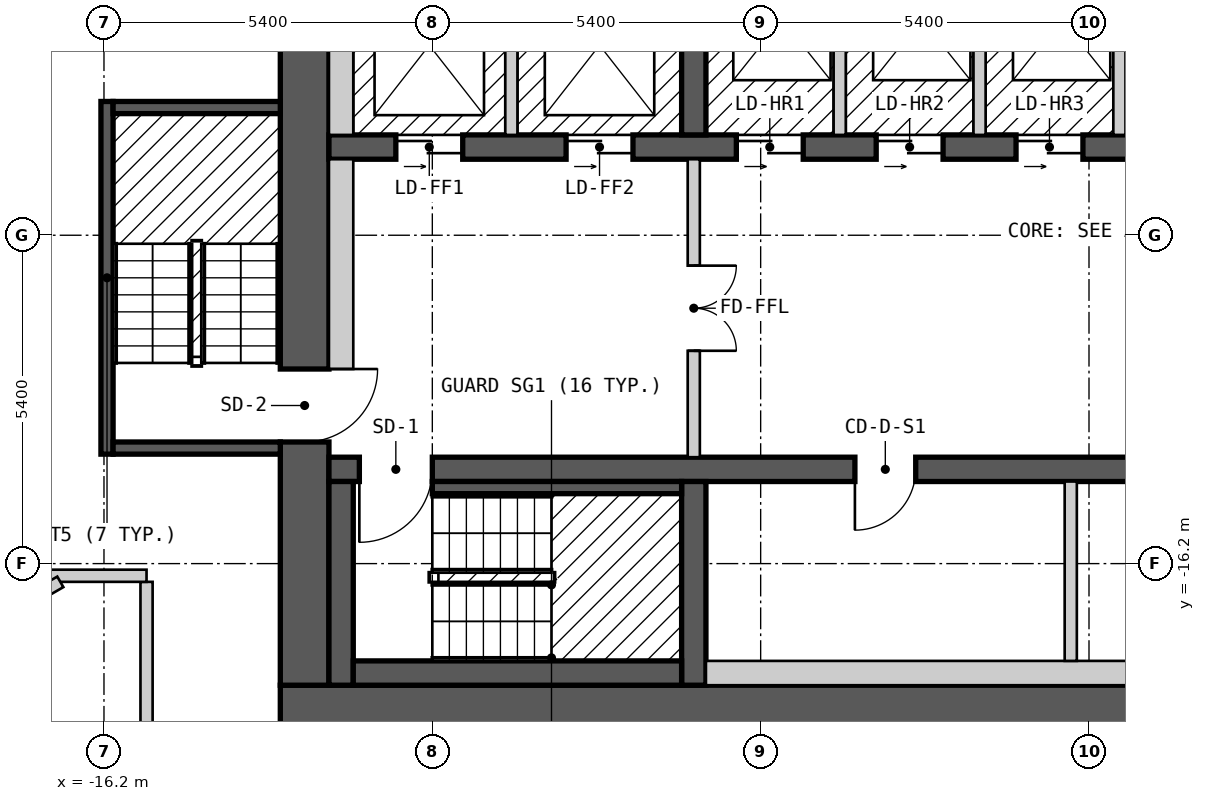
"""IFC4 building model, lengths in metres.
Left out: names, types, materials, properties, quantities, classifications, styles, units other than length and angle.
Written with IfcOpenShell. Run it as: python <this file> out.ifc"""

import sys

from ifc_helpers import new_model, si_unit, direction, frame, frame_2d, origin, place, context, subcontext, project, spatial, polyline, rectangle, outline, extrude, element, fill, save


model = new_model("IFC4")
c1 = context("Model", 3, precision=1e-05, world=origin(), true_north=direction((0.0, 1.0)))
c2 = subcontext(c1, "Body", "Model", "MODEL_VIEW")
j1 = project(units=[si_unit("LENGTHUNIT", "METRE"), si_unit("PLANEANGLEUNIT", "RADIAN")], contexts=[c1])
p1 = place(None, origin())
s1 = spatial("IfcSite", under=j1, at=p1, CompositionType="ELEMENT")
p2 = place(p1, origin())
s2 = spatial("IfcBuilding", under=s1, at=p2, CompositionType="ELEMENT")
p3 = place(p2, frame((0.0, 0.0, 144.6)))
s3 = spatial("IfcBuildingStorey", under=s2, at=p3, CompositionType="ELEMENT", Elevation=144.6)
p4 = place(p3, frame((-13.3, -18.6, 0.0), z_axis=(0.0, 0.0, 1.0), x_axis=(1.0, 0.0, 0.0)))
e1 = element("IfcWall", 1, at=p4, inside=s3, PredefinedType="SHEAR", context=c2, shape_type="SweptSolid", body=[
    extrude(rectangle(XDim=26.6, YDim=0.8, at=frame_2d((13.3, 0.0))), origin(), (0.0, 0.0, 1.0), 2.7),
])
p5 = place(p3, frame((-12.9, -18.2, 0.0), z_axis=(0.0, 0.0, 1.0), x_axis=(0.0, 1.0, 0.0)))
e2 = element("IfcWall", 2, at=p5, inside=s3, PredefinedType="SHEAR", context=c2, shape_type="SweptSolid", body=[
    extrude(rectangle(XDim=12.4, YDim=0.8, at=frame_2d((6.2, 0.0))), origin(), (0.0, 0.0, 1.0), 2.7),
])
p6 = place(p5, frame((4.0, 0.0, 0.0)))
e3 = element("IfcOpeningElement", 3, at=p6, cuts=e2, PredefinedType="OPENING", context=c2, shape_type="SweptSolid", body=[
    extrude(rectangle(XDim=1.2, YDim=2.1, at=frame_2d((0.6, 1.05))), frame((0.0, 0.41, 0.0), z_axis=(0.0, -1.0, 0.0), x_axis=(1.0, 0.0, 0.0)), (0.0, 0.0, 1.0), 0.82),
])
p7 = place(p3, frame((-12.5, -14.65, 0.0), z_axis=(0.0, 0.0, 1.0), x_axis=(1.0, 0.0, 0.0)))
e4 = element("IfcWall", 4, at=p7, inside=s3, PredefinedType="SHEAR", context=c2, shape_type="SweptSolid", body=[
    extrude(rectangle(XDim=25.0, YDim=0.4, at=frame_2d((12.5, 0.0))), origin(), (0.0, 0.0, 1.0), 2.7),
])
p8 = place(p7, frame((1.7, 0.0, 0.0), z_axis=(0.0, 0.0, 1.0), x_axis=(-1.0, 0.0, 0.0)))
e5 = element("IfcOpeningElement", 5, at=p8, cuts=e4, PredefinedType="OPENING", context=c2, shape_type="SweptSolid", body=[
    extrude(rectangle(XDim=1.2, YDim=2.1, at=frame_2d((0.6, 1.05))), frame((0.0, 0.21, 0.0), z_axis=(0.0, -1.0, 0.0), x_axis=(1.0, 0.0, 0.0)), (0.0, 0.0, 1.0), 0.42),
])
p9 = place(p7, frame((24.55, 0.0, 0.0), z_axis=(0.0, 0.0, 1.0), x_axis=(-1.0, 0.0, 0.0)))
e6 = element("IfcOpeningElement", 6, at=p9, cuts=e4, PredefinedType="OPENING", context=c2, shape_type="SweptSolid", body=[
    extrude(rectangle(XDim=1.2, YDim=2.1, at=frame_2d((0.6, 1.05))), frame((0.0, 0.21, 0.0), z_axis=(0.0, -1.0, 0.0), x_axis=(1.0, 0.0, 0.0)), (0.0, 0.0, 1.0), 0.42),
])
p10 = place(p7, frame((9.65, 0.0, 0.0), z_axis=(0.0, 0.0, 1.0), x_axis=(-1.0, 0.0, 0.0)))
e7 = element("IfcOpeningElement", 7, at=p10, cuts=e4, PredefinedType="OPENING", context=c2, shape_type="SweptSolid", body=[
    extrude(rectangle(XDim=1.0, YDim=2.1, at=frame_2d((0.5, 1.05))), frame((0.0, 0.21, 0.0), z_axis=(0.0, -1.0, 0.0), x_axis=(1.0, 0.0, 0.0)), (0.0, 0.0, 1.0), 0.42),
])
p11 = place(p7, frame((16.05, 0.0, 0.0), z_axis=(0.0, 0.0, 1.0), x_axis=(-1.0, 0.0, 0.0)))
e8 = element("IfcOpeningElement", 8, at=p11, cuts=e4, PredefinedType="OPENING", context=c2, shape_type="SweptSolid", body=[
    extrude(rectangle(XDim=1.0, YDim=2.1, at=frame_2d((0.5, 1.05))), frame((0.0, 0.21, 0.0), z_axis=(0.0, -1.0, 0.0), x_axis=(1.0, 0.0, 0.0)), (0.0, 0.0, 1.0), 0.42),
])
p12 = place(p3, frame((-12.5, -9.35, 0.0), z_axis=(0.0, 0.0, 1.0), x_axis=(1.0, 0.0, 0.0)))
e9 = element("IfcWall", 9, at=p12, inside=s3, PredefinedType="SHEAR", context=c2, shape_type="SweptSolid", body=[
    extrude(rectangle(XDim=22.7, YDim=0.4, at=frame_2d((11.35, 0.0))), origin(), (0.0, 0.0, 1.0), 2.7),
])
p13 = place(p12, frame((1.1, 0.0, 0.0)))
e10 = element("IfcOpeningElement", 10, at=p13, cuts=e9, PredefinedType="OPENING", context=c2, shape_type="SweptSolid", body=[
    extrude(rectangle(XDim=1.1, YDim=2.1, at=frame_2d((0.55, 1.05))), frame((0.0, 0.21, 0.0), z_axis=(0.0, -1.0, 0.0), x_axis=(1.0, 0.0, 0.0)), (0.0, 0.0, 1.0), 0.42),
])
p14 = place(p12, frame((3.9, 0.0, 0.0)))
e11 = element("IfcOpeningElement", 11, at=p14, cuts=e9, PredefinedType="OPENING", context=c2, shape_type="SweptSolid", body=[
    extrude(rectangle(XDim=1.1, YDim=2.1, at=frame_2d((0.55, 1.05))), frame((0.0, 0.21, 0.0), z_axis=(0.0, -1.0, 0.0), x_axis=(1.0, 0.0, 0.0)), (0.0, 0.0, 1.0), 0.42),
])
p15 = place(p12, frame((6.7, 0.0, 0.0)))
e12 = element("IfcOpeningElement", 12, at=p15, cuts=e9, PredefinedType="OPENING", context=c2, shape_type="SweptSolid", body=[
    extrude(rectangle(XDim=1.1, YDim=2.1, at=frame_2d((0.55, 1.05))), frame((0.0, 0.21, 0.0), z_axis=(0.0, -1.0, 0.0), x_axis=(1.0, 0.0, 0.0)), (0.0, 0.0, 1.0), 0.42),
])
p16 = place(p12, frame((9.0, 0.0, 0.0)))
e13 = element("IfcOpeningElement", 13, at=p16, cuts=e9, PredefinedType="OPENING", context=c2, shape_type="SweptSolid", body=[
    extrude(rectangle(XDim=1.1, YDim=2.1, at=frame_2d((0.55, 1.05))), frame((0.0, 0.21, 0.0), z_axis=(0.0, -1.0, 0.0), x_axis=(1.0, 0.0, 0.0)), (0.0, 0.0, 1.0), 0.42),
])
p17 = place(p12, frame((11.3, 0.0, 0.0)))
e14 = element("IfcOpeningElement", 14, at=p17, cuts=e9, PredefinedType="OPENING", context=c2, shape_type="SweptSolid", body=[
    extrude(rectangle(XDim=1.1, YDim=2.1, at=frame_2d((0.55, 1.05))), frame((0.0, 0.21, 0.0), z_axis=(0.0, -1.0, 0.0), x_axis=(1.0, 0.0, 0.0)), (0.0, 0.0, 1.0), 0.42),
])
p18 = place(p12, frame((13.6, 0.0, 0.0)))
e15 = element("IfcOpeningElement", 15, at=p18, cuts=e9, PredefinedType="OPENING", context=c2, shape_type="SweptSolid", body=[
    extrude(rectangle(XDim=1.1, YDim=2.1, at=frame_2d((0.55, 1.05))), frame((0.0, 0.21, 0.0), z_axis=(0.0, -1.0, 0.0), x_axis=(1.0, 0.0, 0.0)), (0.0, 0.0, 1.0), 0.42),
])
p19 = place(p12, frame((15.9, 0.0, 0.0)))
e16 = element("IfcOpeningElement", 16, at=p19, cuts=e9, PredefinedType="OPENING", context=c2, shape_type="SweptSolid", body=[
    extrude(rectangle(XDim=1.1, YDim=2.1, at=frame_2d((0.55, 1.05))), frame((0.0, 0.21, 0.0), z_axis=(0.0, -1.0, 0.0), x_axis=(1.0, 0.0, 0.0)), (0.0, 0.0, 1.0), 0.42),
])
p20 = place(p12, frame((18.2, 0.0, 0.0)))
e17 = element("IfcOpeningElement", 17, at=p20, cuts=e9, PredefinedType="OPENING", context=c2, shape_type="SweptSolid", body=[
    extrude(rectangle(XDim=1.1, YDim=2.1, at=frame_2d((0.55, 1.05))), frame((0.0, 0.21, 0.0), z_axis=(0.0, -1.0, 0.0), x_axis=(1.0, 0.0, 0.0)), (0.0, 0.0, 1.0), 0.42),
])
p21 = place(p12, frame((20.6, 0.0, 0.0)))
e18 = element("IfcOpeningElement", 18, at=p21, cuts=e9, PredefinedType="OPENING", context=c2, shape_type="SweptSolid", body=[
    extrude(rectangle(XDim=1.1, YDim=2.1, at=frame_2d((0.55, 1.05))), frame((0.0, 0.21, 0.0), z_axis=(0.0, -1.0, 0.0), x_axis=(1.0, 0.0, 0.0)), (0.0, 0.0, 1.0), 0.42),
])
for number, where, z_axis, x_axis in (
    (19, (-6.5, -18.2, 0.0), (0.0, 0.0, 1.0), (0.0, 1.0, 0.0)),
    (20, (-6.5, -9.15, 0.0), (0.0, 0.0, 1.0), (0.0, 1.0, 0.0)),
):
    element("IfcWall", number, at=place(p3, frame(where, z_axis=z_axis, x_axis=x_axis)), inside=s3, PredefinedType="SHEAR", context=c2, shape_type="SweptSolid", body=[
        extrude(rectangle(XDim=3.35, YDim=0.4, at=frame_2d((1.675, 0.0))), origin(), (0.0, 0.0, 1.0), 2.7),
    ])
p22 = place(p3, frame((-28.218, -2.025, 0.0), z_axis=(0.0, 0.0, 1.0), x_axis=(0.500017503135, -0.866015298109, 0.0)))
e21 = element("IfcWall", 21, at=p22, inside=s3, PredefinedType="SOLIDWALL", context=c2, shape_type="SweptSolid", body=[
    extrude(outline(polyline([(0.0, -0.15), (24.711, -0.15), (24.631, 0.15), (0.08, 0.15), (0.0, -0.15)])), origin(), (0.0, 0.0, 1.0), 2.7),
])
p23 = place(p22, frame((1.4, 0.0, 0.15)))
e22 = element("IfcOpeningElement", 22, at=p23, cuts=e21, PredefinedType="OPENING", context=c2, shape_type="SweptSolid", body=[
    extrude(rectangle(XDim=1.5, YDim=2.1, at=frame_2d((0.75, 1.05))), frame((0.0, 0.16, 0.0), z_axis=(0.0, -1.0, 0.0), x_axis=(1.0, 0.0, 0.0)), (0.0, 0.0, 1.0), 0.32),
])
p24 = place(p22, frame((4.316, 0.0, 0.15)))
e23 = element("IfcOpeningElement", 23, at=p24, cuts=e21, PredefinedType="OPENING", context=c2, shape_type="SweptSolid", body=[
    extrude(rectangle(XDim=1.5, YDim=2.1, at=frame_2d((0.75, 1.05))), frame((0.0, 0.16, 0.0), z_axis=(0.0, -1.0, 0.0), x_axis=(1.0, 0.0, 0.0)), (0.0, 0.0, 1.0), 0.32),
])
p25 = place(p22, frame((7.231, 0.0, 0.15)))
e24 = element("IfcOpeningElement", 24, at=p25, cuts=e21, PredefinedType="OPENING", context=c2, shape_type="SweptSolid", body=[
    extrude(rectangle(XDim=1.5, YDim=2.1, at=frame_2d((0.75, 1.05))), frame((0.0, 0.16, 0.0), z_axis=(0.0, -1.0, 0.0), x_axis=(1.0, 0.0, 0.0)), (0.0, 0.0, 1.0), 0.32),
])
p26 = place(p22, frame((10.147, 0.0, 0.15)))
e25 = element("IfcOpeningElement", 25, at=p26, cuts=e21, PredefinedType="OPENING", context=c2, shape_type="SweptSolid", body=[
    extrude(rectangle(XDim=1.5, YDim=2.1, at=frame_2d((0.75, 1.05))), frame((0.0, 0.16, 0.0), z_axis=(0.0, -1.0, 0.0), x_axis=(1.0, 0.0, 0.0)), (0.0, 0.0, 1.0), 0.32),
])
p27 = place(p22, frame((13.062, 0.0, 0.15)))
e26 = element("IfcOpeningElement", 26, at=p27, cuts=e21, PredefinedType="OPENING", context=c2, shape_type="SweptSolid", body=[
    extrude(rectangle(XDim=1.5, YDim=2.1, at=frame_2d((0.75, 1.05))), frame((0.0, 0.16, 0.0), z_axis=(0.0, -1.0, 0.0), x_axis=(1.0, 0.0, 0.0)), (0.0, 0.0, 1.0), 0.32),
])
p28 = place(p22, frame((15.977, 0.0, 0.15)))
e27 = element("IfcOpeningElement", 27, at=p28, cuts=e21, PredefinedType="OPENING", context=c2, shape_type="SweptSolid", body=[
    extrude(rectangle(XDim=1.5, YDim=2.1, at=frame_2d((0.75, 1.05))), frame((0.0, 0.16, 0.0), z_axis=(0.0, -1.0, 0.0), x_axis=(1.0, 0.0, 0.0)), (0.0, 0.0, 1.0), 0.32),
])
p29 = place(p22, frame((18.893, 0.0, 0.15)))
e28 = element("IfcOpeningElement", 28, at=p29, cuts=e21, PredefinedType="OPENING", context=c2, shape_type="SweptSolid", body=[
    extrude(rectangle(XDim=1.5, YDim=2.1, at=frame_2d((0.75, 1.05))), frame((0.0, 0.16, 0.0), z_axis=(0.0, -1.0, 0.0), x_axis=(1.0, 0.0, 0.0)), (0.0, 0.0, 1.0), 0.32),
])
p30 = place(p22, frame((21.809, 0.0, 0.15)))
e29 = element("IfcOpeningElement", 29, at=p30, cuts=e21, PredefinedType="OPENING", context=c2, shape_type="SweptSolid", body=[
    extrude(rectangle(XDim=1.5, YDim=2.1, at=frame_2d((0.75, 1.05))), frame((0.0, 0.16, 0.0), z_axis=(0.0, -1.0, 0.0), x_axis=(1.0, 0.0, 0.0)), (0.0, 0.0, 1.0), 0.32),
])
p31 = place(p3, frame((-15.5, -16.5, 0.0), z_axis=(0.0, 0.0, 1.0), x_axis=(0.0, -1.0, 0.0)))
e30 = element("IfcWall", 30, at=p31, inside=s3, PredefinedType="PARTITIONING", context=c2, shape_type="SweptSolid", body=[
    extrude(rectangle(XDim=4.599, YDim=0.2, at=frame_2d((2.3, 0.0))), origin(), (0.0, 0.0, 1.0), 2.7),
])
p32 = place(p3, frame((-18.249, -16.4, 0.0), z_axis=(0.0, 0.0, 1.0), x_axis=(1.0, 0.0, 0.0)))
e31 = element("IfcWall", 31, at=p32, inside=s3, PredefinedType="PARTITIONING", context=c2, shape_type="SweptSolid", body=[
    extrude(rectangle(XDim=2.749, YDim=0.2, at=frame_2d((1.375, 0.0))), origin(), (0.0, 0.0, 1.0), 2.7),
])
p33 = place(p3, frame((-18.995, -17.699, 0.0), z_axis=(0.0, 0.0, 1.0), x_axis=(0.86607371389, 0.499916315105, 0.0)))
e32 = element("IfcWall", 32, at=p33, inside=s3, PredefinedType="PARTITIONING", context=c2, shape_type="SweptSolid", body=[
    extrude(rectangle(XDim=2.398, YDim=0.2, at=frame_2d((1.199, 0.0))), origin(), (0.0, 0.0, 1.0), 2.7),
])
p34 = place(p3, frame((-16.15, -14.4, 0.0), z_axis=(0.0, 0.0, 1.0), x_axis=(0.0, 1.0, 0.0)))
e33 = element("IfcWall", 33, at=p34, inside=s3, PredefinedType="SOLIDWALL", context=c2, shape_type="SweptSolid", body=[
    extrude(rectangle(XDim=5.8, YDim=0.2, at=frame_2d((2.9, 0.0))), origin(), (0.0, 0.0, 1.0), 2.7),
])
for number, where, z_axis, x_axis in (
    (34, (-16.05, -14.3, 0.0), (0.0, 0.0, 1.0), (1.0, 0.0, 0.0)),
    (35, (-16.05, -8.7, 0.0), (0.0, 0.0, 1.0), (1.0, 0.0, 0.0)),
):
    element("IfcWall", number, at=place(p3, frame(where, z_axis=z_axis, x_axis=x_axis)), inside=s3, PredefinedType="SOLIDWALL", context=c2, shape_type="SweptSolid", body=[
        extrude(rectangle(XDim=2.75, YDim=0.2, at=frame_2d((1.375, 0.0))), origin(), (0.0, 0.0, 1.0), 2.7),
    ])
p35 = place(p3, frame((-12.3, -18.2, 0.0), z_axis=(0.0, 0.0, 1.0), x_axis=(0.0, 1.0, 0.0)))
e36 = element("IfcWall", 36, at=p35, inside=s3, PredefinedType="SOLIDWALL", context=c2, shape_type="SweptSolid", body=[
    extrude(rectangle(XDim=3.35, YDim=0.4, at=frame_2d((1.675, 0.0))), origin(), (0.0, 0.0, 1.0), 2.7),
])
p36 = place(p3, frame((-12.3, -13.0, 0.0), z_axis=(0.0, 0.0, 1.0), x_axis=(0.0, 1.0, 0.0)))
e37 = element("IfcWall", 37, at=p36, inside=s3, PredefinedType="PARTITIONING", context=c2, shape_type="SweptSolid", body=[
    extrude(rectangle(XDim=3.45, YDim=0.4, at=frame_2d((1.725, 0.0))), origin(), (0.0, 0.0, 1.0), 2.7),
])
p37 = place(p3, frame((-12.3, -9.15, 0.0), z_axis=(0.0, 0.0, 1.0), x_axis=(0.0, 1.0, 0.0)))
e38 = element("IfcWall", 38, at=p37, inside=s3, PredefinedType="SOLIDWALL", context=c2, shape_type="SweptSolid", body=[
    extrude(rectangle(XDim=3.35, YDim=0.4, at=frame_2d((1.675, 0.0))), origin(), (0.0, 0.0, 1.0), 2.7),
])
p38 = place(p3, frame((-12.1, -18.0, 0.0), z_axis=(0.0, 0.0, 1.0), x_axis=(1.0, 0.0, 0.0)))
e39 = element("IfcWall", 39, at=p38, inside=s3, PredefinedType="SOLIDWALL", context=c2, shape_type="SweptSolid", body=[
    extrude(rectangle(XDim=5.4, YDim=0.4, at=frame_2d((2.7, 0.0))), origin(), (0.0, 0.0, 1.0), 2.7),
])
p39 = place(p3, frame((-10.8, -14.95, 0.0), z_axis=(0.0, 0.0, 1.0), x_axis=(1.0, 0.0, 0.0)))
e40 = element("IfcWall", 40, at=p39, inside=s3, PredefinedType="SOLIDWALL", context=c2, shape_type="SweptSolid", body=[
    extrude(rectangle(XDim=4.1, YDim=0.2, at=frame_2d((2.05, 0.0))), origin(), (0.0, 0.0, 1.0), 2.7),
])
p40 = place(p3, frame((-9.5, -9.15, 0.0), z_axis=(0.0, 0.0, 1.0), x_axis=(0.0, 1.0, 0.0)))
e41 = element("IfcWall", 41, at=p40, inside=s3, PredefinedType="SOLIDWALL", context=c2, shape_type="SweptSolid", body=[
    extrude(rectangle(XDim=2.95, YDim=0.2, at=frame_2d((1.475, 0.0))), origin(), (0.0, 0.0, 1.0), 2.7),
])
p41 = place(p3, frame((-6.5, -14.45, 0.0), z_axis=(0.0, 0.0, 1.0), x_axis=(0.0, 1.0, 0.0)))
e42 = element("IfcWall", 42, at=p41, inside=s3, PredefinedType="PARTITIONING", context=c2, shape_type="SweptSolid", body=[
    extrude(rectangle(XDim=4.9, YDim=0.2, at=frame_2d((2.45, 0.0))), origin(), (0.0, 0.0, 1.0), 2.7),
])
p42 = place(p41, frame((3.15, 0.0, 0.0), z_axis=(0.0, 0.0, 1.0), x_axis=(-1.0, 0.0, 0.0)))
e43 = element("IfcOpeningElement", 43, at=p42, cuts=e42, PredefinedType="OPENING", context=c2, shape_type="SweptSolid", body=[
    extrude(rectangle(XDim=1.4, YDim=2.1, at=frame_2d((0.7, 1.05))), frame((0.0, 0.11, 0.0), z_axis=(0.0, -1.0, 0.0), x_axis=(1.0, 0.0, 0.0)), (0.0, 0.0, 1.0), 0.22),
])
p43 = place(p3, frame((-6.3, -18.0, 0.0), z_axis=(0.0, 0.0, 1.0), x_axis=(1.0, 0.0, 0.0)))
e44 = element("IfcWall", 44, at=p43, inside=s3, PredefinedType="PARTITIONING", context=c2, shape_type="SweptSolid", body=[
    extrude(rectangle(XDim=12.6, YDim=0.4, at=frame_2d((6.3, 0.0))), origin(), (0.0, 0.0, 1.0), 2.7),
])
for number, where, z_axis, x_axis in (
    (45, (-4.1, -9.15, 0.0), (0.0, 0.0, 1.0), (0.0, 1.0, 0.0)),
    (46, (-1.8, -9.15, 0.0), (0.0, 0.0, 1.0), (0.0, 1.0, 0.0)),
):
    element("IfcWall", number, at=place(p3, frame(where, z_axis=z_axis, x_axis=x_axis)), inside=s3, PredefinedType="SOLIDWALL", context=c2, shape_type="SweptSolid", body=[
        extrude(rectangle(XDim=2.95, YDim=0.2, at=frame_2d((1.475, 0.0))), origin(), (0.0, 0.0, 1.0), 2.7),
    ])
p44 = place(p3, frame((-0.3, -17.8, 0.0), z_axis=(0.0, 0.0, 1.0), x_axis=(0.0, 1.0, 0.0)))
e47 = element("IfcWall", 47, at=p44, inside=s3, PredefinedType="PARTITIONING", context=c2, shape_type="SweptSolid", body=[
    extrude(rectangle(XDim=2.95, YDim=0.2, at=frame_2d((1.475, 0.0))), origin(), (0.0, 0.0, 1.0), 2.7),
])
p45 = place(p3, frame((0.5, -9.15, 0.0), z_axis=(0.0, 0.0, 1.0), x_axis=(0.0, 1.0, 0.0)))
e48 = element("IfcWall", 48, at=p45, inside=s3, PredefinedType="SOLIDWALL", context=c2, shape_type="SweptSolid", body=[
    extrude(rectangle(XDim=2.95, YDim=0.2, at=frame_2d((1.475, 0.0))), origin(), (0.0, 0.0, 1.0), 2.7),
])
p46 = place(p13, origin())
e49 = element("IfcDoor", 49, at=p46, inside=s3, OperationType="DOUBLE_DOOR_SLIDING", PredefinedType="DOOR", context=c2, shape_type="SweptSolid", body=[
    extrude(rectangle(XDim=1.1, YDim=2.1, at=frame_2d((0.55, 1.05))), frame((0.0, 0.025, 0.0), z_axis=(0.0, -1.0, 0.0), x_axis=(1.0, 0.0, 0.0)), (0.0, 0.0, 1.0), 0.05),
])
fill(e10, e49)
p47 = place(p14, origin())
e50 = element("IfcDoor", 50, at=p47, inside=s3, OperationType="DOUBLE_DOOR_SLIDING", PredefinedType="DOOR", context=c2, shape_type="SweptSolid", body=[
    extrude(rectangle(XDim=1.1, YDim=2.1, at=frame_2d((0.55, 1.05))), frame((0.0, 0.025, 0.0), z_axis=(0.0, -1.0, 0.0), x_axis=(1.0, 0.0, 0.0)), (0.0, 0.0, 1.0), 0.05),
])
fill(e11, e50)
p48 = place(p15, origin())
e51 = element("IfcDoor", 51, at=p48, inside=s3, OperationType="DOUBLE_DOOR_SLIDING", PredefinedType="DOOR", context=c2, shape_type="SweptSolid", body=[
    extrude(rectangle(XDim=1.1, YDim=2.1, at=frame_2d((0.55, 1.05))), frame((0.0, 0.025, 0.0), z_axis=(0.0, -1.0, 0.0), x_axis=(1.0, 0.0, 0.0)), (0.0, 0.0, 1.0), 0.05),
])
fill(e12, e51)
p49 = place(p16, origin())
e52 = element("IfcDoor", 52, at=p49, inside=s3, OperationType="DOUBLE_DOOR_SLIDING", PredefinedType="DOOR", context=c2, shape_type="SweptSolid", body=[
    extrude(rectangle(XDim=1.1, YDim=2.1, at=frame_2d((0.55, 1.05))), frame((0.0, 0.025, 0.0), z_axis=(0.0, -1.0, 0.0), x_axis=(1.0, 0.0, 0.0)), (0.0, 0.0, 1.0), 0.05),
])
fill(e13, e52)
p50 = place(p17, origin())
e53 = element("IfcDoor", 53, at=p50, inside=s3, OperationType="DOUBLE_DOOR_SLIDING", PredefinedType="DOOR", context=c2, shape_type="SweptSolid", body=[
    extrude(rectangle(XDim=1.1, YDim=2.1, at=frame_2d((0.55, 1.05))), frame((0.0, 0.025, 0.0), z_axis=(0.0, -1.0, 0.0), x_axis=(1.0, 0.0, 0.0)), (0.0, 0.0, 1.0), 0.05),
])
fill(e14, e53)
p51 = place(p8, origin())
e54 = element("IfcDoor", 54, at=p51, inside=s3, OperationType="SINGLE_SWING_RIGHT", PredefinedType="DOOR", context=c2, shape_type="SweptSolid", body=[
    extrude(rectangle(XDim=1.2, YDim=2.1, at=frame_2d((0.6, 1.05))), frame((0.0, 0.025, 0.0), z_axis=(0.0, -1.0, 0.0), x_axis=(1.0, 0.0, 0.0)), (0.0, 0.0, 1.0), 0.05),
])
fill(e5, e54)
p52 = place(p6, origin())
e55 = element("IfcDoor", 55, at=p52, inside=s3, OperationType="SINGLE_SWING_RIGHT", PredefinedType="DOOR", context=c2, shape_type="SweptSolid", body=[
    extrude(rectangle(XDim=1.2, YDim=2.1, at=frame_2d((0.6, 1.05))), frame((0.0, 0.025, 0.0), z_axis=(0.0, -1.0, 0.0), x_axis=(1.0, 0.0, 0.0)), (0.0, 0.0, 1.0), 0.05),
])
fill(e3, e55)
p53 = place(p42, origin())
e56 = element("IfcDoor", 56, at=p53, inside=s3, OperationType="DOUBLE_DOOR_SINGLE_SWING", PredefinedType="DOOR", context=c2, shape_type="SweptSolid", body=[
    extrude(rectangle(XDim=1.4, YDim=2.1, at=frame_2d((0.7, 1.05))), frame((0.0, 0.025, 0.0), z_axis=(0.0, -1.0, 0.0), x_axis=(1.0, 0.0, 0.0)), (0.0, 0.0, 1.0), 0.05),
])
fill(e43, e56)
p54 = place(p10, origin())
e57 = element("IfcDoor", 57, at=p54, inside=s3, OperationType="SINGLE_SWING_RIGHT", PredefinedType="DOOR", context=c2, shape_type="SweptSolid", body=[
    extrude(rectangle(XDim=1.0, YDim=2.1, at=frame_2d((0.5, 1.05))), frame((0.0, 0.025, 0.0), z_axis=(0.0, -1.0, 0.0), x_axis=(1.0, 0.0, 0.0)), (0.0, 0.0, 1.0), 0.05),
])
fill(e7, e57)
save(model, sys.argv[1])
